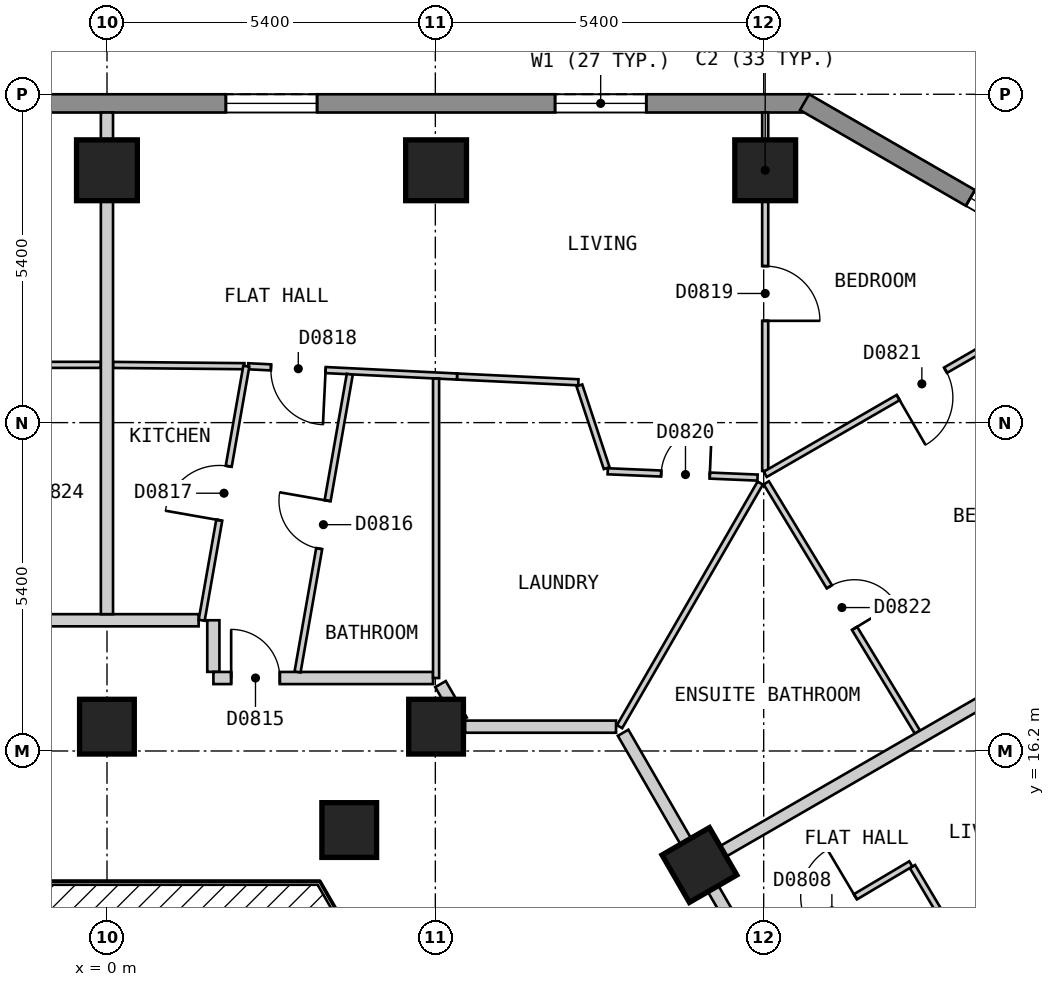
"""IFC4 building model, lengths in metres.
Left out: names, types, materials, properties, quantities, classifications, styles, units other than length and angle.
Written with IfcOpenShell. Run it as: python <this file> out.ifc"""

import sys

from ifc_helpers import new_model, si_unit, direction, frame, frame_2d, origin, origin_2d, place, context, subcontext, project, spatial, polyline, rectangle, outline, extrude, element, fill, save


model = new_model("IFC4")
c1 = context("Model", 3, precision=1e-05, world=origin(), true_north=direction((0.0, 1.0)))
c2 = subcontext(c1, "Body", "Model", "MODEL_VIEW")
j1 = project(units=[si_unit("LENGTHUNIT", "METRE"), si_unit("PLANEANGLEUNIT", "RADIAN")], contexts=[c1])
p1 = place(None, origin())
s1 = spatial("IfcSite", under=j1, at=p1, CompositionType="ELEMENT")
p2 = place(p1, origin())
s2 = spatial("IfcBuilding", under=s1, at=p2, CompositionType="ELEMENT")
p3 = place(p2, frame((0.0, 0.0, 72.0)))
s3 = spatial("IfcBuildingStorey", under=s2, at=p3, CompositionType="ELEMENT", Elevation=72.0)
for number, where, z_axis, x_axis in (
    (1, (10.825, 25.75, 0.0), (0.0, 0.0, 1.0), (-1.0, 0.0, 0.0)),
    (2, (5.412, 25.75, 0.0), (0.0, 0.0, 1.0), (-1.0, 0.0, 0.0)),
    (3, (-0.001, 25.75, 0.0), (0.0, 0.0, 1.0), (-1.0, 0.0, 0.0)),
):
    element("IfcColumn", number, at=place(p3, frame(where, z_axis=z_axis, x_axis=x_axis)), inside=s3, PredefinedType="COLUMN", context=c2, shape_type="SweptSolid", body=[
        extrude(rectangle(XDim=1.0, YDim=1.0, at=origin_2d()), origin(), (0.0, 0.0, 1.0), 3.0),
    ])
for number, where, z_axis, x_axis in (
    (4, (9.743, 14.325, 0.0), (0.0, 0.0, 1.0), (-0.5, 0.866, 0.0)),
    (5, (5.412, 16.6, 0.0), (0.0, 0.0, 1.0), (-1.0, 0.0, 0.0)),
    (6, (3.984, 14.9, 0.0), (0.0, 0.0, 1.0), (1.0, 0.0, 0.0)),
    (7, (-0.001, 16.6, 0.0), (0.0, 0.0, 1.0), (-1.0, 0.0, 0.0)),
):
    element("IfcColumn", number, at=place(p3, frame(where, z_axis=z_axis, x_axis=x_axis)), inside=s3, PredefinedType="COLUMN", context=c2, shape_type="SweptSolid", body=[
        extrude(rectangle(XDim=0.9, YDim=0.9, at=origin_2d()), origin(), (0.0, 0.0, 1.0), 3.0),
    ])
p4 = place(p3, frame((11.547, 26.85, 0.0), z_axis=(0.0, 0.0, 1.0), x_axis=(-1.0, 0.0, 0.0)))
e8 = element("IfcWall", 8, at=p4, inside=s3, PredefinedType="SOLIDWALL", context=c2, shape_type="SweptSolid", body=[
    extrude(outline(polyline([(0.0, -0.15), (23.094, -0.15), (23.014, 0.15), (0.08, 0.15), (0.0, -0.15)])), origin(), (0.0, 0.0, 1.0), 2.7),
])
p5 = place(p4, frame((2.678, 0.0, 0.15)))
e9 = element("IfcOpeningElement", 9, at=p5, cuts=e8, PredefinedType="OPENING", context=c2, shape_type="SweptSolid", body=[
    extrude(rectangle(XDim=1.5, YDim=2.1, at=frame_2d((0.75, 1.05))), frame((0.0, 0.16, 0.0), z_axis=(0.0, -1.0, 0.0), x_axis=(1.0, 0.0, 0.0)), (0.0, 0.0, 1.0), 0.32),
])
p6 = place(p4, frame((8.092, 0.0, 0.15)))
e10 = element("IfcOpeningElement", 10, at=p6, cuts=e8, PredefinedType="OPENING", context=c2, shape_type="SweptSolid", body=[
    extrude(rectangle(XDim=1.5, YDim=2.1, at=frame_2d((0.75, 1.05))), frame((0.0, 0.16, 0.0), z_axis=(0.0, -1.0, 0.0), x_axis=(1.0, 0.0, 0.0)), (0.0, 0.0, 1.0), 0.32),
])
p7 = place(p4, frame((13.504, 0.0, 0.15)))
e11 = element("IfcOpeningElement", 11, at=p7, cuts=e8, PredefinedType="OPENING", context=c2, shape_type="SweptSolid", body=[
    extrude(rectangle(XDim=1.5, YDim=2.1, at=frame_2d((0.75, 1.05))), frame((0.0, 0.16, 0.0), z_axis=(0.0, -1.0, 0.0), x_axis=(1.0, 0.0, 0.0)), (0.0, 0.0, 1.0), 0.32),
])
p8 = place(p4, frame((18.917, 0.0, 0.15)))
e12 = element("IfcOpeningElement", 12, at=p8, cuts=e8, PredefinedType="OPENING", context=c2, shape_type="SweptSolid", body=[
    extrude(rectangle(XDim=1.5, YDim=2.1, at=frame_2d((0.75, 1.05))), frame((0.0, 0.16, 0.0), z_axis=(0.0, -1.0, 0.0), x_axis=(1.0, 0.0, 0.0)), (0.0, 0.0, 1.0), 0.32),
])
p9 = place(p3, frame((15.802, 24.37, 0.0), z_axis=(0.0, 0.0, 1.0), x_axis=(-0.866022959057, 0.500004234368, 0.0)))
e13 = element("IfcWall", 13, at=p9, inside=s3, PredefinedType="SOLIDWALL", context=c2, shape_type="SweptSolid", body=[
    extrude(outline(polyline([(0.0, -0.15), (5.0, -0.15), (4.92, 0.15), (0.08, 0.15), (0.0, -0.15)])), origin(), (0.0, 0.0, 1.0), 2.7),
])
p10 = place(p9, frame((0.65, 0.0, 0.15)))
e14 = element("IfcOpeningElement", 14, at=p10, cuts=e13, PredefinedType="OPENING", context=c2, shape_type="SweptSolid", body=[
    extrude(rectangle(XDim=1.2, YDim=2.1, at=frame_2d((0.6, 1.05))), frame((0.0, 0.16, 0.0), z_axis=(0.0, -1.0, 0.0), x_axis=(1.0, 0.0, 0.0)), (0.0, 0.0, 1.0), 0.32),
])
p11 = place(p3, frame((5.485, 17.3, 0.0), z_axis=(0.0, 0.0, 1.0), x_axis=(0.499437640892, -0.866349838611, 0.0)))
e15 = element("IfcWall", 15, at=p11, inside=s3, PredefinedType="PARTITIONING", context=c2, shape_type="SweptSolid", body=[
    extrude(rectangle(XDim=0.693, YDim=0.2, at=frame_2d((0.346, 0.0))), origin(), (0.0, 0.0, 1.0), 2.7),
])
p12 = place(p3, frame((8.488, 16.5, 0.0), z_axis=(0.0, 0.0, 1.0), x_axis=(0.499986836607, -0.86603300354, 0.0)))
e16 = element("IfcWall", 16, at=p12, inside=s3, PredefinedType="PARTITIONING", context=c2, shape_type="SweptSolid", body=[
    extrude(rectangle(XDim=20.09, YDim=0.2, at=frame_2d((10.045, 0.0))), origin(), (0.0, 0.0, 1.0), 2.7),
])
p13 = place(p12, frame((4.523, 0.0, 0.0)))
e17 = element("IfcOpeningElement", 17, at=p13, cuts=e16, PredefinedType="OPENING", context=c2, shape_type="SweptSolid", body=[
    extrude(rectangle(XDim=1.0, YDim=2.1, at=frame_2d((0.5, 1.05))), frame((0.0, 0.11, 0.0), z_axis=(0.0, -1.0, 0.0), x_axis=(1.0, 0.0, 0.0)), (0.0, 0.0, 1.0), 0.22),
])
p14 = place(p3, frame((1.749, 18.35, 0.0), z_axis=(0.0, 0.0, 1.0), x_axis=(0.0, -1.0, 0.0)))
e18 = element("IfcWall", 18, at=p14, inside=s3, PredefinedType="PARTITIONING", context=c2, shape_type="SweptSolid", body=[
    extrude(rectangle(XDim=0.849, YDim=0.2, at=frame_2d((0.425, 0.0))), origin(), (0.0, 0.0, 1.0), 2.7),
])
p15 = place(p3, frame((5.889, 16.6, 0.0), z_axis=(0.0, 0.0, 1.0), x_axis=(1.0, 0.0, 0.0)))
e19 = element("IfcWall", 19, at=p15, inside=s3, PredefinedType="PARTITIONING", context=c2, shape_type="SweptSolid", body=[
    extrude(rectangle(XDim=2.483, YDim=0.2, at=frame_2d((1.242, 0.0))), origin(), (0.0, 0.0, 1.0), 2.7),
])
p16 = place(p3, frame((1.75, 17.4, 0.0), z_axis=(0.0, 0.0, 1.0), x_axis=(1.0, 0.0, 0.0)))
e20 = element("IfcWall", 20, at=p16, inside=s3, PredefinedType="PARTITIONING", context=c2, shape_type="SweptSolid", body=[
    extrude(rectangle(XDim=3.612, YDim=0.2, at=frame_2d((1.806, 0.0))), origin(), (0.0, 0.0, 1.0), 2.7),
])
p17 = place(p16, frame((0.292, 0.0, 0.0)))
e21 = element("IfcOpeningElement", 21, at=p17, cuts=e20, PredefinedType="OPENING", context=c2, shape_type="SweptSolid", body=[
    extrude(rectangle(XDim=0.8, YDim=2.1, at=frame_2d((0.4, 1.05))), frame((0.0, 0.11, 0.0), z_axis=(0.0, -1.0, 0.0), x_axis=(1.0, 0.0, 0.0)), (0.0, 0.0, 1.0), 0.22),
])
p18 = place(p3, frame((-5.314, 18.35, 0.0), z_axis=(0.0, 0.0, 1.0), x_axis=(1.0, 0.0, 0.0)))
e22 = element("IfcWall", 22, at=p18, inside=s3, PredefinedType="PARTITIONING", context=c2, shape_type="SweptSolid", body=[
    extrude(rectangle(XDim=6.821, YDim=0.2, at=frame_2d((3.411, 0.0))), origin(), (0.0, 0.0, 1.0), 2.7),
])
p19 = place(p18, frame((2.106, 0.0, 0.0)))
e23 = element("IfcOpeningElement", 23, at=p19, cuts=e22, PredefinedType="OPENING", context=c2, shape_type="SweptSolid", body=[
    extrude(rectangle(XDim=1.0, YDim=2.1, at=frame_2d((0.5, 1.05))), frame((0.0, 0.11, 0.0), z_axis=(0.0, -1.0, 0.0), x_axis=(1.0, 0.0, 0.0)), (0.0, 0.0, 1.0), 0.22),
])
p20 = place(p3, frame((0.099, 22.549, 0.0), z_axis=(0.0, 0.0, 1.0), x_axis=(0.99995279897, -0.009715957599, 0.0)))
e24 = element("IfcWall", 24, at=p20, inside=s3, PredefinedType="PARTITIONING", context=c2, shape_type="SweptSolid", body=[
    extrude(rectangle(XDim=2.161, YDim=0.1, at=frame_2d((1.081, 0.0))), origin(), (0.0, 0.0, 1.0), 2.7),
])
p21 = place(p3, frame((7.769, 22.212, 0.0), z_axis=(0.0, 0.0, 1.0), x_axis=(0.313312924695, -0.949649941409, 0.0)))
e25 = element("IfcWall", 25, at=p21, inside=s3, PredefinedType="PARTITIONING", context=c2, shape_type="SweptSolid", body=[
    extrude(rectangle(XDim=1.433, YDim=0.1, at=frame_2d((0.717, 0.0))), origin(), (0.0, 0.0, 1.0), 2.7),
])
p22 = place(p3, frame((10.843, 20.61, 0.0), z_axis=(0.0, 0.0, 1.0), x_axis=(0.518481125811, -0.855089072657, 0.0)))
e26 = element("IfcWall", 26, at=p22, inside=s3, PredefinedType="PARTITIONING", context=c2, shape_type="SweptSolid", body=[
    extrude(rectangle(XDim=4.795, YDim=0.1, at=frame_2d((2.397, 0.0))), origin(), (0.0, 0.0, 1.0), 2.7),
])
p23 = place(p22, frame((1.999, 0.0, 0.0)))
e27 = element("IfcOpeningElement", 27, at=p23, cuts=e26, PredefinedType="OPENING", context=c2, shape_type="SweptSolid", body=[
    extrude(rectangle(XDim=0.8, YDim=2.1, at=frame_2d((0.4, 1.05))), frame((0.0, 0.06, 0.0), z_axis=(0.0, -1.0, 0.0), x_axis=(1.0, 0.0, 0.0)), (0.0, 0.0, 1.0), 0.12),
])
p24 = place(p3, frame((13.247, 14.3, 0.0), z_axis=(0.0, 0.0, 1.0), x_axis=(0.510312234073, -0.85998919979, 0.0)))
e28 = element("IfcWall", 28, at=p24, inside=s3, PredefinedType="PARTITIONING", context=c2, shape_type="SweptSolid", body=[
    extrude(rectangle(XDim=3.163, YDim=0.1, at=frame_2d((1.582, 0.0))), origin(), (0.0, 0.0, 1.0), 2.7),
])
p25 = place(p3, frame((8.235, 20.8, 0.0), z_axis=(0.0, 0.0, 1.0), x_axis=(0.999110277005, -0.042174096116, 0.0)))
e29 = element("IfcWall", 29, at=p25, inside=s3, PredefinedType="PARTITIONING", context=c2, shape_type="SweptSolid", body=[
    extrude(rectangle(XDim=2.466, YDim=0.1, at=frame_2d((1.233, 0.0))), origin(), (0.0, 0.0, 1.0), 2.7),
])
p26 = place(p25, frame((0.88, 0.0, 0.0)))
e30 = element("IfcOpeningElement", 30, at=p26, cuts=e29, PredefinedType="OPENING", context=c2, shape_type="SweptSolid", body=[
    extrude(rectangle(XDim=0.8, YDim=2.1, at=frame_2d((0.4, 1.05))), frame((0.0, 0.06, 0.0), z_axis=(0.0, -1.0, 0.0), x_axis=(1.0, 0.0, 0.0)), (0.0, 0.0, 1.0), 0.12),
])
p27 = place(p3, frame((5.757, 22.358, 0.0), z_axis=(0.0, 0.0, 1.0), x_axis=(0.998868690804, -0.047553533316, 0.0)))
e31 = element("IfcWall", 31, at=p27, inside=s3, PredefinedType="PARTITIONING", context=c2, shape_type="SweptSolid", body=[
    extrude(rectangle(XDim=1.997, YDim=0.1, at=frame_2d((0.999, 0.0))), origin(), (0.0, 0.0, 1.0), 2.7),
])
p28 = place(p3, frame((2.321, 22.527, 0.0), z_axis=(0.0, 0.0, 1.0), x_axis=(0.998789924329, -0.049180149038, 0.0)))
e32 = element("IfcWall", 32, at=p28, inside=s3, PredefinedType="PARTITIONING", context=c2, shape_type="SweptSolid", body=[
    extrude(rectangle(XDim=3.44, YDim=0.1, at=frame_2d((1.72, 0.0))), origin(), (0.0, 0.0, 1.0), 2.7),
])
p29 = place(p28, frame((0.376, 0.0, 0.0)))
e33 = element("IfcOpeningElement", 33, at=p29, cuts=e32, PredefinedType="OPENING", context=c2, shape_type="SweptSolid", body=[
    extrude(rectangle(XDim=0.9, YDim=2.1, at=frame_2d((0.45, 1.05))), frame((0.0, 0.06, 0.0), z_axis=(0.0, -1.0, 0.0), x_axis=(1.0, 0.0, 0.0)), (0.0, 0.0, 1.0), 0.12),
])
p30 = place(p3, frame((-5.384, 22.55, 0.0), z_axis=(0.0, 0.0, 1.0), x_axis=(1.0, 0.0, 0.0)))
e34 = element("IfcWall", 34, at=p30, inside=s3, PredefinedType="PARTITIONING", context=c2, shape_type="SweptSolid", body=[
    extrude(rectangle(XDim=5.283, YDim=0.1, at=frame_2d((2.642, 0.0))), origin(), (0.0, 0.0, 1.0), 2.7),
])
p31 = place(p30, frame((2.226, 0.0, 0.0)))
e35 = element("IfcOpeningElement", 35, at=p31, cuts=e34, PredefinedType="OPENING", context=c2, shape_type="SweptSolid", body=[
    extrude(rectangle(XDim=0.9, YDim=2.1, at=frame_2d((0.45, 1.05))), frame((0.0, 0.06, 0.0), z_axis=(0.0, -1.0, 0.0), x_axis=(1.0, 0.0, 0.0)), (0.0, 0.0, 1.0), 0.12),
])
p32 = place(p3, frame((8.43, 16.6, 0.0), z_axis=(0.0, 0.0, 1.0), x_axis=(0.50003312339, 0.866006279142, 0.0)))
e36 = element("IfcWall", 36, at=p32, inside=s3, PredefinedType="PARTITIONING", context=c2, shape_type="SweptSolid", body=[
    extrude(rectangle(XDim=4.626, YDim=0.1, at=frame_2d((2.313, 0.0))), origin(), (0.0, 0.0, 1.0), 2.7),
])
p33 = place(p3, frame((3.134, 17.5, 0.0), z_axis=(0.0, 0.0, 1.0), x_axis=(0.172821216702, 0.984953210593, 0.0)))
e37 = element("IfcWall", 37, at=p33, inside=s3, PredefinedType="PARTITIONING", context=c2, shape_type="SweptSolid", body=[
    extrude(rectangle(XDim=4.97, YDim=0.1, at=frame_2d((2.485, 0.0))), origin(), (0.0, 0.0, 1.0), 2.7),
])
p34 = place(p33, frame((2.059, 0.0, 0.0)))
e38 = element("IfcOpeningElement", 38, at=p34, cuts=e37, PredefinedType="OPENING", context=c2, shape_type="SweptSolid", body=[
    extrude(rectangle(XDim=0.8, YDim=2.1, at=frame_2d((0.4, 1.05))), frame((0.0, 0.06, 0.0), z_axis=(0.0, -1.0, 0.0), x_axis=(1.0, 0.0, 0.0)), (0.0, 0.0, 1.0), 0.12),
])
p35 = place(p3, frame((1.557, 18.35, 0.0), z_axis=(0.0, 0.0, 1.0), x_axis=(0.173062973099, 0.984910761106, 0.0)))
e39 = element("IfcWall", 39, at=p35, inside=s3, PredefinedType="PARTITIONING", context=c2, shape_type="SweptSolid", body=[
    extrude(rectangle(XDim=4.242, YDim=0.1, at=frame_2d((2.121, 0.0))), origin(), (0.0, 0.0, 1.0), 2.7),
])
p36 = place(p35, frame((1.671, 0.0, 0.0)))
e40 = element("IfcOpeningElement", 40, at=p36, cuts=e39, PredefinedType="OPENING", context=c2, shape_type="SweptSolid", body=[
    extrude(rectangle(XDim=0.9, YDim=2.1, at=frame_2d((0.45, 1.05))), frame((0.0, 0.06, 0.0), z_axis=(0.0, -1.0, 0.0), x_axis=(1.0, 0.0, 0.0)), (0.0, 0.0, 1.0), 0.12),
])
p37 = place(p3, frame((5.412, 17.4, 0.0), z_axis=(0.0, 0.0, 1.0), x_axis=(0.0, 1.0, 0.0)))
e41 = element("IfcWall", 41, at=p37, inside=s3, PredefinedType="PARTITIONING", context=c2, shape_type="SweptSolid", body=[
    extrude(rectangle(XDim=4.925, YDim=0.1, at=frame_2d((2.462, 0.0))), origin(), (0.0, 0.0, 1.0), 2.7),
])
p38 = place(p3, frame((10.825, 20.806, 0.0), z_axis=(0.0, 0.0, 1.0), x_axis=(0.0, 1.0, 0.0)))
e42 = element("IfcWall", 42, at=p38, inside=s3, PredefinedType="PARTITIONING", context=c2, shape_type="SweptSolid", body=[
    extrude(rectangle(XDim=5.894, YDim=0.1, at=frame_2d((2.947, 0.0))), origin(), (0.0, 0.0, 1.0), 2.7),
])
p39 = place(p38, frame((2.468, 0.0, 0.0)))
e43 = element("IfcOpeningElement", 43, at=p39, cuts=e42, PredefinedType="OPENING", context=c2, shape_type="SweptSolid", body=[
    extrude(rectangle(XDim=0.9, YDim=2.1, at=frame_2d((0.45, 1.05))), frame((0.0, 0.06, 0.0), z_axis=(0.0, -1.0, 0.0), x_axis=(1.0, 0.0, 0.0)), (0.0, 0.0, 1.0), 0.12),
])
p40 = place(p3, frame((10.826, 20.75, 0.0), z_axis=(0.0, 0.0, 1.0), x_axis=(0.865986712877, 0.50006700863, 0.0)))
e44 = element("IfcWall", 44, at=p40, inside=s3, PredefinedType="PARTITIONING", context=c2, shape_type="SweptSolid", body=[
    extrude(rectangle(XDim=5.949, YDim=0.1, at=frame_2d((2.975, 0.0))), origin(), (0.0, 0.0, 1.0), 2.7),
])
p41 = place(p40, frame((2.524, 0.0, 0.0)))
e45 = element("IfcOpeningElement", 45, at=p41, cuts=e44, PredefinedType="OPENING", context=c2, shape_type="SweptSolid", body=[
    extrude(rectangle(XDim=0.9, YDim=2.1, at=frame_2d((0.45, 1.05))), frame((0.0, 0.06, 0.0), z_axis=(0.0, -1.0, 0.0), x_axis=(1.0, 0.0, 0.0)), (0.0, 0.0, 1.0), 0.12),
])
p42 = place(p3, frame((12.342, 10.025, 0.0), z_axis=(0.0, 0.0, 1.0), x_axis=(0.865992435864, 0.500057097767, 0.0)))
e46 = element("IfcWall", 46, at=p42, inside=s3, PredefinedType="PARTITIONING", context=c2, shape_type="SweptSolid", body=[
    extrude(rectangle(XDim=9.999, YDim=0.1, at=frame_2d((5.0, 0.0))), origin(), (0.0, 0.0, 1.0), 2.7),
])
p43 = place(p42, frame((4.795, 0.0, 0.0)))
e47 = element("IfcOpeningElement", 47, at=p43, cuts=e46, PredefinedType="OPENING", context=c2, shape_type="SweptSolid", body=[
    extrude(rectangle(XDim=0.9, YDim=2.1, at=frame_2d((0.45, 1.05))), frame((0.0, 0.06, 0.0), z_axis=(0.0, -1.0, 0.0), x_axis=(1.0, 0.0, 0.0)), (0.0, 0.0, 1.0), 0.12),
])
p44 = place(p3, frame((10.709, 12.853, 0.0), z_axis=(0.0, 0.0, 1.0), x_axis=(0.859991215576, 0.510308837011, 0.0)))
e48 = element("IfcWall", 48, at=p44, inside=s3, PredefinedType="PARTITIONING", context=c2, shape_type="SweptSolid", body=[
    extrude(rectangle(XDim=2.92, YDim=0.1, at=frame_2d((1.46, 0.0))), origin(), (0.0, 0.0, 1.0), 2.7),
])
p45 = place(p44, frame((0.96, 0.0, 0.0)))
e49 = element("IfcOpeningElement", 49, at=p45, cuts=e48, PredefinedType="OPENING", context=c2, shape_type="SweptSolid", body=[
    extrude(rectangle(XDim=0.9, YDim=2.1, at=frame_2d((0.45, 1.05))), frame((0.0, 0.06, 0.0), z_axis=(0.0, -1.0, 0.0), x_axis=(1.0, 0.0, 0.0)), (0.0, 0.0, 1.0), 0.12),
])
p46 = place(p3, frame((-0.001, 18.45, 0.0), z_axis=(0.0, 0.0, 1.0), x_axis=(0.0, 1.0, 0.0)))
e50 = element("IfcWall", 50, at=p46, inside=s3, PredefinedType="PARTITIONING", context=c2, shape_type="SweptSolid", body=[
    extrude(rectangle(XDim=8.25, YDim=0.2, at=frame_2d((4.125, 0.0))), origin(), (0.0, 0.0, 1.0), 2.7),
])
p47 = place(p3, frame((9.83, 14.375, 0.0), z_axis=(0.0, 0.0, 1.0), x_axis=(0.865992435864, 0.500057097767, 0.0)))
e51 = element("IfcWall", 51, at=p47, inside=s3, PredefinedType="PARTITIONING", context=c2, shape_type="SweptSolid", body=[
    extrude(rectangle(XDim=9.999, YDim=0.2, at=frame_2d((5.0, 0.0))), origin(), (0.0, 0.0, 1.0), 2.7),
])
p48 = place(p5, origin())
e52 = element("IfcWindow", 52, at=p48, inside=s3, PartitioningType="SINGLE_PANEL", PredefinedType="WINDOW", context=c2, shape_type="SweptSolid", body=[
    extrude(rectangle(XDim=1.5, YDim=2.1, at=frame_2d((0.75, 1.05))), frame((0.0, 0.03, 0.0), z_axis=(0.0, -1.0, 0.0), x_axis=(1.0, 0.0, 0.0)), (0.0, 0.0, 1.0), 0.06),
])
fill(e9, e52)
p49 = place(p6, origin())
e53 = element("IfcWindow", 53, at=p49, inside=s3, PartitioningType="SINGLE_PANEL", PredefinedType="WINDOW", context=c2, shape_type="SweptSolid", body=[
    extrude(rectangle(XDim=1.5, YDim=2.1, at=frame_2d((0.75, 1.05))), frame((0.0, 0.03, 0.0), z_axis=(0.0, -1.0, 0.0), x_axis=(1.0, 0.0, 0.0)), (0.0, 0.0, 1.0), 0.06),
])
fill(e10, e53)
p50 = place(p10, origin())
e54 = element("IfcWindow", 54, at=p50, inside=s3, PartitioningType="SINGLE_PANEL", PredefinedType="WINDOW", context=c2, shape_type="SweptSolid", body=[
    extrude(rectangle(XDim=1.2, YDim=2.1, at=frame_2d((0.6, 1.05))), frame((0.0, 0.03, 0.0), z_axis=(0.0, -1.0, 0.0), x_axis=(1.0, 0.0, 0.0)), (0.0, 0.0, 1.0), 0.06),
])
fill(e14, e54)
p51 = place(p45, origin())
e55 = element("IfcDoor", 55, at=p51, inside=s3, OperationType="SINGLE_SWING_RIGHT", PredefinedType="DOOR", context=c2, shape_type="SweptSolid", body=[
    extrude(rectangle(XDim=0.9, YDim=2.1, at=frame_2d((0.45, 1.05))), frame((0.0, 0.025, 0.0), z_axis=(0.0, -1.0, 0.0), x_axis=(1.0, 0.0, 0.0)), (0.0, 0.0, 1.0), 0.05),
])
fill(e49, e55)
p52 = place(p17, origin())
e56 = element("IfcDoor", 56, at=p52, inside=s3, OperationType="SINGLE_SWING_LEFT", PredefinedType="DOOR", context=c2, shape_type="SweptSolid", body=[
    extrude(rectangle(XDim=0.8, YDim=2.1, at=frame_2d((0.4, 1.05))), frame((0.0, 0.025, 0.0), z_axis=(0.0, -1.0, 0.0), x_axis=(1.0, 0.0, 0.0)), (0.0, 0.0, 1.0), 0.05),
])
fill(e21, e56)
p53 = place(p34, origin())
e57 = element("IfcDoor", 57, at=p53, inside=s3, OperationType="SINGLE_SWING_RIGHT", PredefinedType="DOOR", context=c2, shape_type="SweptSolid", body=[
    extrude(rectangle(XDim=0.8, YDim=2.1, at=frame_2d((0.4, 1.05))), frame((0.0, 0.025, 0.0), z_axis=(0.0, -1.0, 0.0), x_axis=(1.0, 0.0, 0.0)), (0.0, 0.0, 1.0), 0.05),
])
fill(e38, e57)
p54 = place(p36, origin())
e58 = element("IfcDoor", 58, at=p54, inside=s3, OperationType="SINGLE_SWING_LEFT", PredefinedType="DOOR", context=c2, shape_type="SweptSolid", body=[
    extrude(rectangle(XDim=0.9, YDim=2.1, at=frame_2d((0.45, 1.05))), frame((0.0, 0.025, 0.0), z_axis=(0.0, -1.0, 0.0), x_axis=(1.0, 0.0, 0.0)), (0.0, 0.0, 1.0), 0.05),
])
fill(e40, e58)
p55 = place(p29, origin())
e59 = element("IfcDoor", 59, at=p55, inside=s3, OperationType="SINGLE_SWING_RIGHT", PredefinedType="DOOR", context=c2, shape_type="SweptSolid", body=[
    extrude(rectangle(XDim=0.9, YDim=2.1, at=frame_2d((0.45, 1.05))), frame((0.0, 0.025, 0.0), z_axis=(0.0, -1.0, 0.0), x_axis=(1.0, 0.0, 0.0)), (0.0, 0.0, 1.0), 0.05),
])
fill(e33, e59)
p56 = place(p39, origin())
e60 = element("IfcDoor", 60, at=p56, inside=s3, OperationType="SINGLE_SWING_LEFT", PredefinedType="DOOR", context=c2, shape_type="SweptSolid", body=[
    extrude(rectangle(XDim=0.9, YDim=2.1, at=frame_2d((0.45, 1.05))), frame((0.0, 0.025, 0.0), z_axis=(0.0, -1.0, 0.0), x_axis=(1.0, 0.0, 0.0)), (0.0, 0.0, 1.0), 0.05),
])
fill(e43, e60)
p57 = place(p26, origin())
e61 = element("IfcDoor", 61, at=p57, inside=s3, OperationType="SINGLE_SWING_RIGHT", PredefinedType="DOOR", context=c2, shape_type="SweptSolid", body=[
    extrude(rectangle(XDim=0.8, YDim=2.1, at=frame_2d((0.4, 1.05))), frame((0.0, 0.025, 0.0), z_axis=(0.0, -1.0, 0.0), x_axis=(1.0, 0.0, 0.0)), (0.0, 0.0, 1.0), 0.05),
])
fill(e30, e61)
p58 = place(p41, origin())
e62 = element("IfcDoor", 62, at=p58, inside=s3, OperationType="SINGLE_SWING_LEFT", PredefinedType="DOOR", context=c2, shape_type="SweptSolid", body=[
    extrude(rectangle(XDim=0.9, YDim=2.1, at=frame_2d((0.45, 1.05))), frame((0.0, 0.025, 0.0), z_axis=(0.0, -1.0, 0.0), x_axis=(1.0, 0.0, 0.0)), (0.0, 0.0, 1.0), 0.05),
])
fill(e45, e62)
p59 = place(p23, origin())
e63 = element("IfcDoor", 63, at=p59, inside=s3, OperationType="SINGLE_SWING_RIGHT", PredefinedType="DOOR", context=c2, shape_type="SweptSolid", body=[
    extrude(rectangle(XDim=0.8, YDim=2.1, at=frame_2d((0.4, 1.05))), frame((0.0, 0.025, 0.0), z_axis=(0.0, -1.0, 0.0), x_axis=(1.0, 0.0, 0.0)), (0.0, 0.0, 1.0), 0.05),
])
fill(e27, e63)
save(model, sys.argv[1])
